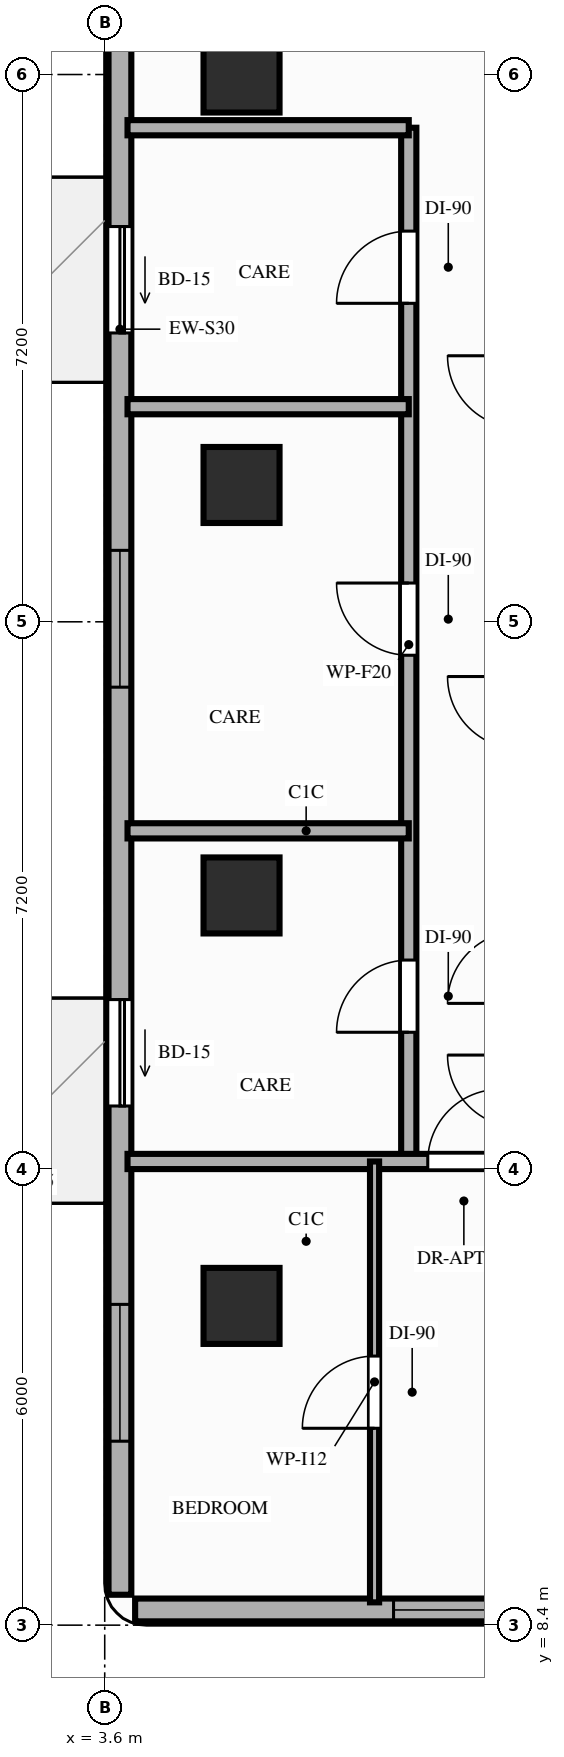
"""IFC4 building model, lengths in metres.
Left out: names, types, materials, properties, quantities, classifications, styles, units other than length and angle.
Written with IfcOpenShell. Run it as: python <this file> out.ifc"""

import sys

from ifc_helpers import new_model, si_unit, direction, frame, frame_2d, origin, origin_2d, place, context, subcontext, project, spatial, rectangle, extrude, element, fill, save


model = new_model("IFC4")
c1 = context("Model", 3, precision=1e-05, world=origin(), true_north=direction((0.0, 1.0)))
c2 = subcontext(c1, "Body", "Model", "MODEL_VIEW")
j1 = project(units=[si_unit("LENGTHUNIT", "METRE"), si_unit("PLANEANGLEUNIT", "RADIAN")], contexts=[c1])
p1 = place(None, origin())
s1 = spatial("IfcSite", under=j1, at=p1, CompositionType="ELEMENT")
p2 = place(p1, origin())
s2 = spatial("IfcBuilding", under=s1, at=p2, CompositionType="ELEMENT")
p3 = place(p2, frame((0.0, 0.0, 113.8)))
s3 = spatial("IfcBuildingStorey", under=s2, at=p3, CompositionType="ELEMENT", Elevation=113.8)
for number, where, z_axis, x_axis in (
    (1, (5.4, 12.6, 0.0), (0.0, 0.0, 1.0), (1.0, 0.0, 0.0)),
    (2, (5.4, 18.0, 0.0), (0.0, 0.0, 1.0), (1.0, 0.0, 0.0)),
    (3, (5.4, 23.4, 0.0), (0.0, 0.0, 1.0), (1.0, 0.0, 0.0)),
    (4, (5.4, 28.8, 0.0), (0.0, 0.0, 1.0), (1.0, 0.0, 0.0)),
):
    element("IfcColumn", number, at=place(p3, frame(where, z_axis=z_axis, x_axis=x_axis)), inside=s3, PredefinedType="COLUMN", context=c2, shape_type="SweptSolid", body=[
        extrude(rectangle(XDim=1.0, YDim=1.0, at=origin_2d()), origin(), (0.0, 0.0, 1.0), 3.2),
    ])
p4 = place(p3, frame((4.0, 8.6, 0.0), z_axis=(0.0, 0.0, 1.0), x_axis=(1.0, 0.0, 0.0)))
e5 = element("IfcWall", 5, at=p4, inside=s3, PredefinedType="STANDARD", context=c2, shape_type="SweptSolid", body=[
    extrude(rectangle(XDim=15.8, YDim=0.3, at=frame_2d((7.9, 0.0))), origin(), (0.0, 0.0, 1.0), 3.02),
])
p5 = place(p4, frame((6.57, 0.0, 0.85)))
e6 = element("IfcOpeningElement", 6, at=p5, cuts=e5, PredefinedType="OPENING", context=c2, shape_type="SweptSolid", body=[
    extrude(rectangle(XDim=1.8, YDim=1.75, at=frame_2d((0.9, 0.875))), frame((0.0, 0.16, 0.0), z_axis=(0.0, -1.0, 0.0), x_axis=(1.0, 0.0, 0.0)), (0.0, 0.0, 1.0), 0.32),
])
p6 = place(p4, frame((3.4, 0.0, 0.85)))
e7 = element("IfcOpeningElement", 7, at=p6, cuts=e5, PredefinedType="OPENING", context=c2, shape_type="SweptSolid", body=[
    extrude(rectangle(XDim=1.8, YDim=1.75, at=frame_2d((0.9, 0.875))), frame((0.0, 0.16, 0.0), z_axis=(0.0, -1.0, 0.0), x_axis=(1.0, 0.0, 0.0)), (0.0, 0.0, 1.0), 0.32),
])
p7 = place(p3, frame((3.8, 42.1, 0.0), z_axis=(0.0, 0.0, 1.0), x_axis=(0.0, -1.0, 0.0)))
e8 = element("IfcWall", 8, at=p7, inside=s3, PredefinedType="STANDARD", context=c2, shape_type="SweptSolid", body=[
    extrude(rectangle(XDim=33.3, YDim=0.3, at=frame_2d((16.65, 0.0))), origin(), (0.0, 0.0, 1.0), 2.7),
])
p8 = place(p7, frame((25.47, 0.0, 0.0)))
e9 = element("IfcOpeningElement", 9, at=p8, cuts=e8, PredefinedType="OPENING", context=c2, shape_type="SweptSolid", body=[
    extrude(rectangle(XDim=1.4, YDim=2.1, at=frame_2d((0.7, 1.05))), frame((0.0, 0.16, 0.0), z_axis=(0.0, -1.0, 0.0), x_axis=(1.0, 0.0, 0.0)), (0.0, 0.0, 1.0), 0.32),
])
p9 = place(p7, frame((15.3, 0.0, 0.0)))
e10 = element("IfcOpeningElement", 10, at=p9, cuts=e8, PredefinedType="OPENING", context=c2, shape_type="SweptSolid", body=[
    extrude(rectangle(XDim=1.4, YDim=2.1, at=frame_2d((0.7, 1.05))), frame((0.0, 0.16, 0.0), z_axis=(0.0, -1.0, 0.0), x_axis=(1.0, 0.0, 0.0)), (0.0, 0.0, 1.0), 0.32),
])
p10 = place(p7, frame((19.56, 0.0, 0.85)))
e11 = element("IfcOpeningElement", 11, at=p10, cuts=e8, PredefinedType="OPENING", context=c2, shape_type="SweptSolid", body=[
    extrude(rectangle(XDim=1.8, YDim=1.6, at=frame_2d((0.9, 0.8))), frame((0.0, 0.16, 0.0), z_axis=(0.0, -1.0, 0.0), x_axis=(1.0, 0.0, 0.0)), (0.0, 0.0, 1.0), 0.32),
])
p11 = place(p7, frame((29.48, 0.0, 0.85)))
e12 = element("IfcOpeningElement", 12, at=p11, cuts=e8, PredefinedType="OPENING", context=c2, shape_type="SweptSolid", body=[
    extrude(rectangle(XDim=1.8, YDim=1.6, at=frame_2d((0.9, 0.8))), frame((0.0, 0.16, 0.0), z_axis=(0.0, -1.0, 0.0), x_axis=(1.0, 0.0, 0.0)), (0.0, 0.0, 1.0), 0.32),
])
p12 = place(p7, frame((9.9, 0.0, 0.85)))
e13 = element("IfcOpeningElement", 13, at=p12, cuts=e8, PredefinedType="OPENING", context=c2, shape_type="SweptSolid", body=[
    extrude(rectangle(XDim=1.8, YDim=1.6, at=frame_2d((0.9, 0.8))), frame((0.0, 0.16, 0.0), z_axis=(0.0, -1.0, 0.0), x_axis=(1.0, 0.0, 0.0)), (0.0, 0.0, 1.0), 0.32),
])
p13 = place(p7, frame((3.8, 0.0, 0.85)))
e14 = element("IfcOpeningElement", 14, at=p13, cuts=e8, PredefinedType="OPENING", context=c2, shape_type="SweptSolid", body=[
    extrude(rectangle(XDim=1.8, YDim=1.6, at=frame_2d((0.9, 0.8))), frame((0.0, 0.16, 0.0), z_axis=(0.0, -1.0, 0.0), x_axis=(1.0, 0.0, 0.0)), (0.0, 0.0, 1.0), 0.32),
])
p14 = place(p3, frame((7.6, 14.5, 0.0), z_axis=(0.0, 0.0, 1.0), x_axis=(0.0, 1.0, 0.0)))
e15 = element("IfcWall", 15, at=p14, inside=s3, PredefinedType="PARTITIONING", context=c2, shape_type="SweptSolid", body=[
    extrude(rectangle(XDim=13.6, YDim=0.2, at=frame_2d((6.8, 0.0))), origin(), (0.0, 0.0, 1.0), 2.4),
])
p15 = place(p14, frame((1.7, 0.0, 0.0)))
e16 = element("IfcOpeningElement", 16, at=p15, cuts=e15, PredefinedType="OPENING", context=c2, shape_type="SweptSolid", body=[
    extrude(rectangle(XDim=0.95, YDim=2.15, at=frame_2d((0.475, 1.075))), frame((0.0, 0.11, 0.0), z_axis=(0.0, -1.0, 0.0), x_axis=(1.0, 0.0, 0.0)), (0.0, 0.0, 1.0), 0.22),
])
p16 = place(p14, frame((6.66, 0.0, 0.0)))
e17 = element("IfcOpeningElement", 17, at=p16, cuts=e15, PredefinedType="OPENING", context=c2, shape_type="SweptSolid", body=[
    extrude(rectangle(XDim=0.95, YDim=2.15, at=frame_2d((0.475, 1.075))), frame((0.0, 0.11, 0.0), z_axis=(0.0, -1.0, 0.0), x_axis=(1.0, 0.0, 0.0)), (0.0, 0.0, 1.0), 0.22),
])
p17 = place(p14, frame((11.29, 0.0, 0.0)))
e18 = element("IfcOpeningElement", 18, at=p17, cuts=e15, PredefinedType="OPENING", context=c2, shape_type="SweptSolid", body=[
    extrude(rectangle(XDim=0.95, YDim=2.15, at=frame_2d((0.475, 1.075))), frame((0.0, 0.11, 0.0), z_axis=(0.0, -1.0, 0.0), x_axis=(1.0, 0.0, 0.0)), (0.0, 0.0, 1.0), 0.22),
])
p18 = place(p3, frame((3.9, 14.5, 0.0), z_axis=(0.0, 0.0, 1.0), x_axis=(1.0, 0.0, 0.0)))
e19 = element("IfcWall", 19, at=p18, inside=s3, PredefinedType="PARTITIONING", context=c2, shape_type="SweptSolid", body=[
    extrude(rectangle(XDim=16.0, YDim=0.2, at=frame_2d((8.0, 0.0))), origin(), (0.0, 0.0, 1.0), 2.4),
])
p19 = place(p18, frame((3.95, 0.0, 0.0)))
e20 = element("IfcOpeningElement", 20, at=p19, cuts=e19, PredefinedType="OPENING", context=c2, shape_type="SweptSolid", body=[
    extrude(rectangle(XDim=0.95, YDim=2.15, at=frame_2d((0.475, 1.075))), frame((0.0, 0.11, 0.0), z_axis=(0.0, -1.0, 0.0), x_axis=(1.0, 0.0, 0.0)), (0.0, 0.0, 1.0), 0.22),
])
for number, where, z_axis, x_axis in (
    (21, (3.9, 28.1, 0.0), (0.0, 0.0, 1.0), (1.0, 0.0, 0.0)),
    (22, (3.9, 18.85, 0.0), (0.0, 0.0, 1.0), (1.0, 0.0, 0.0)),
    (23, (3.9, 24.43, 0.0), (0.0, 0.0, 1.0), (1.0, 0.0, 0.0)),
):
    element("IfcWall", number, at=place(p3, frame(where, z_axis=z_axis, x_axis=x_axis)), inside=s3, PredefinedType="PARTITIONING", context=c2, shape_type="SweptSolid", body=[
        extrude(rectangle(XDim=3.7, YDim=0.2, at=frame_2d((1.85, 0.0))), origin(), (0.0, 0.0, 1.0), 2.4),
    ])
p20 = place(p3, frame((7.15, 8.7, 0.0), z_axis=(0.0, 0.0, 1.0), x_axis=(0.0, 1.0, 0.0)))
e24 = element("IfcWall", 24, at=p20, inside=s3, PredefinedType="PARTITIONING", context=c2, shape_type="SweptSolid", body=[
    extrude(rectangle(XDim=5.8, YDim=0.12, at=frame_2d((2.9, 0.0))), origin(), (0.0, 0.0, 1.0), 2.4),
])
p21 = place(p20, frame((2.29, 0.0, 0.0)))
e25 = element("IfcOpeningElement", 25, at=p21, cuts=e24, PredefinedType="OPENING", context=c2, shape_type="SweptSolid", body=[
    extrude(rectangle(XDim=0.95, YDim=2.15, at=frame_2d((0.475, 1.075))), frame((0.0, 0.07, 0.0), z_axis=(0.0, -1.0, 0.0), x_axis=(1.0, 0.0, 0.0)), (0.0, 0.0, 1.0), 0.14),
])
p22 = place(p8, origin())
e26 = element("IfcDoor", 26, at=p22, inside=s3, OperationType="SLIDING_TO_RIGHT", PredefinedType="DOOR", context=c2, shape_type="SweptSolid", body=[
    extrude(rectangle(XDim=1.4, YDim=2.1, at=frame_2d((0.7, 1.05))), frame((0.0, 0.025, 0.0), z_axis=(0.0, -1.0, 0.0), x_axis=(1.0, 0.0, 0.0)), (0.0, 0.0, 1.0), 0.05),
])
fill(e9, e26)
p23 = place(p9, origin())
e27 = element("IfcDoor", 27, at=p23, inside=s3, OperationType="SLIDING_TO_RIGHT", PredefinedType="DOOR", context=c2, shape_type="SweptSolid", body=[
    extrude(rectangle(XDim=1.4, YDim=2.1, at=frame_2d((0.7, 1.05))), frame((0.0, 0.025, 0.0), z_axis=(0.0, -1.0, 0.0), x_axis=(1.0, 0.0, 0.0)), (0.0, 0.0, 1.0), 0.05),
])
fill(e10, e27)
p24 = place(p10, origin())
e28 = element("IfcWindow", 28, at=p24, inside=s3, PartitioningType="SINGLE_PANEL", PredefinedType="WINDOW", context=c2, shape_type="SweptSolid", body=[
    extrude(rectangle(XDim=1.8, YDim=1.6, at=frame_2d((0.9, 0.8))), frame((0.0, 0.03, 0.0), z_axis=(0.0, -1.0, 0.0), x_axis=(1.0, 0.0, 0.0)), (0.0, 0.0, 1.0), 0.06),
])
fill(e11, e28)
p25 = place(p11, origin())
e29 = element("IfcWindow", 29, at=p25, inside=s3, PartitioningType="SINGLE_PANEL", PredefinedType="WINDOW", context=c2, shape_type="SweptSolid", body=[
    extrude(rectangle(XDim=1.8, YDim=1.6, at=frame_2d((0.9, 0.8))), frame((0.0, 0.03, 0.0), z_axis=(0.0, -1.0, 0.0), x_axis=(1.0, 0.0, 0.0)), (0.0, 0.0, 1.0), 0.06),
])
fill(e12, e29)
p26 = place(p6, origin())
e30 = element("IfcWindow", 30, at=p26, inside=s3, PartitioningType="SINGLE_PANEL", PredefinedType="WINDOW", context=c2, shape_type="SweptSolid", body=[
    extrude(rectangle(XDim=1.8, YDim=1.75, at=frame_2d((0.9, 0.875))), frame((0.0, 0.03, 0.0), z_axis=(0.0, -1.0, 0.0), x_axis=(1.0, 0.0, 0.0)), (0.0, 0.0, 1.0), 0.06),
])
fill(e7, e30)
p27 = place(p15, origin())
e31 = element("IfcDoor", 31, at=p27, inside=s3, OperationType="SINGLE_SWING_LEFT", PredefinedType="DOOR", context=c2, shape_type="SweptSolid", body=[
    extrude(rectangle(XDim=0.95, YDim=2.15, at=frame_2d((0.475, 1.075))), frame((0.0, 0.025, 0.0), z_axis=(0.0, -1.0, 0.0), x_axis=(1.0, 0.0, 0.0)), (0.0, 0.0, 1.0), 0.05),
])
fill(e16, e31)
p28 = place(p16, origin())
e32 = element("IfcDoor", 32, at=p28, inside=s3, OperationType="SINGLE_SWING_RIGHT", PredefinedType="DOOR", context=c2, shape_type="SweptSolid", body=[
    extrude(rectangle(XDim=0.95, YDim=2.15, at=frame_2d((0.475, 1.075))), frame((0.0, 0.025, 0.0), z_axis=(0.0, -1.0, 0.0), x_axis=(1.0, 0.0, 0.0)), (0.0, 0.0, 1.0), 0.05),
])
fill(e17, e32)
p29 = place(p17, origin())
e33 = element("IfcDoor", 33, at=p29, inside=s3, OperationType="SINGLE_SWING_LEFT", PredefinedType="DOOR", context=c2, shape_type="SweptSolid", body=[
    extrude(rectangle(XDim=0.95, YDim=2.15, at=frame_2d((0.475, 1.075))), frame((0.0, 0.025, 0.0), z_axis=(0.0, -1.0, 0.0), x_axis=(1.0, 0.0, 0.0)), (0.0, 0.0, 1.0), 0.05),
])
fill(e18, e33)
p30 = place(p19, origin())
e34 = element("IfcDoor", 34, at=p30, inside=s3, OperationType="SINGLE_SWING_RIGHT", PredefinedType="DOOR", context=c2, shape_type="SweptSolid", body=[
    extrude(rectangle(XDim=0.95, YDim=2.15, at=frame_2d((0.475, 1.075))), frame((0.0, 0.025, 0.0), z_axis=(0.0, -1.0, 0.0), x_axis=(1.0, 0.0, 0.0)), (0.0, 0.0, 1.0), 0.05),
])
fill(e20, e34)
p31 = place(p21, origin())
e35 = element("IfcDoor", 35, at=p31, inside=s3, OperationType="SINGLE_SWING_LEFT", PredefinedType="DOOR", context=c2, shape_type="SweptSolid", body=[
    extrude(rectangle(XDim=0.95, YDim=2.15, at=frame_2d((0.475, 1.075))), frame((0.0, 0.025, 0.0), z_axis=(0.0, -1.0, 0.0), x_axis=(1.0, 0.0, 0.0)), (0.0, 0.0, 1.0), 0.05),
])
fill(e25, e35)
save(model, sys.argv[1])
